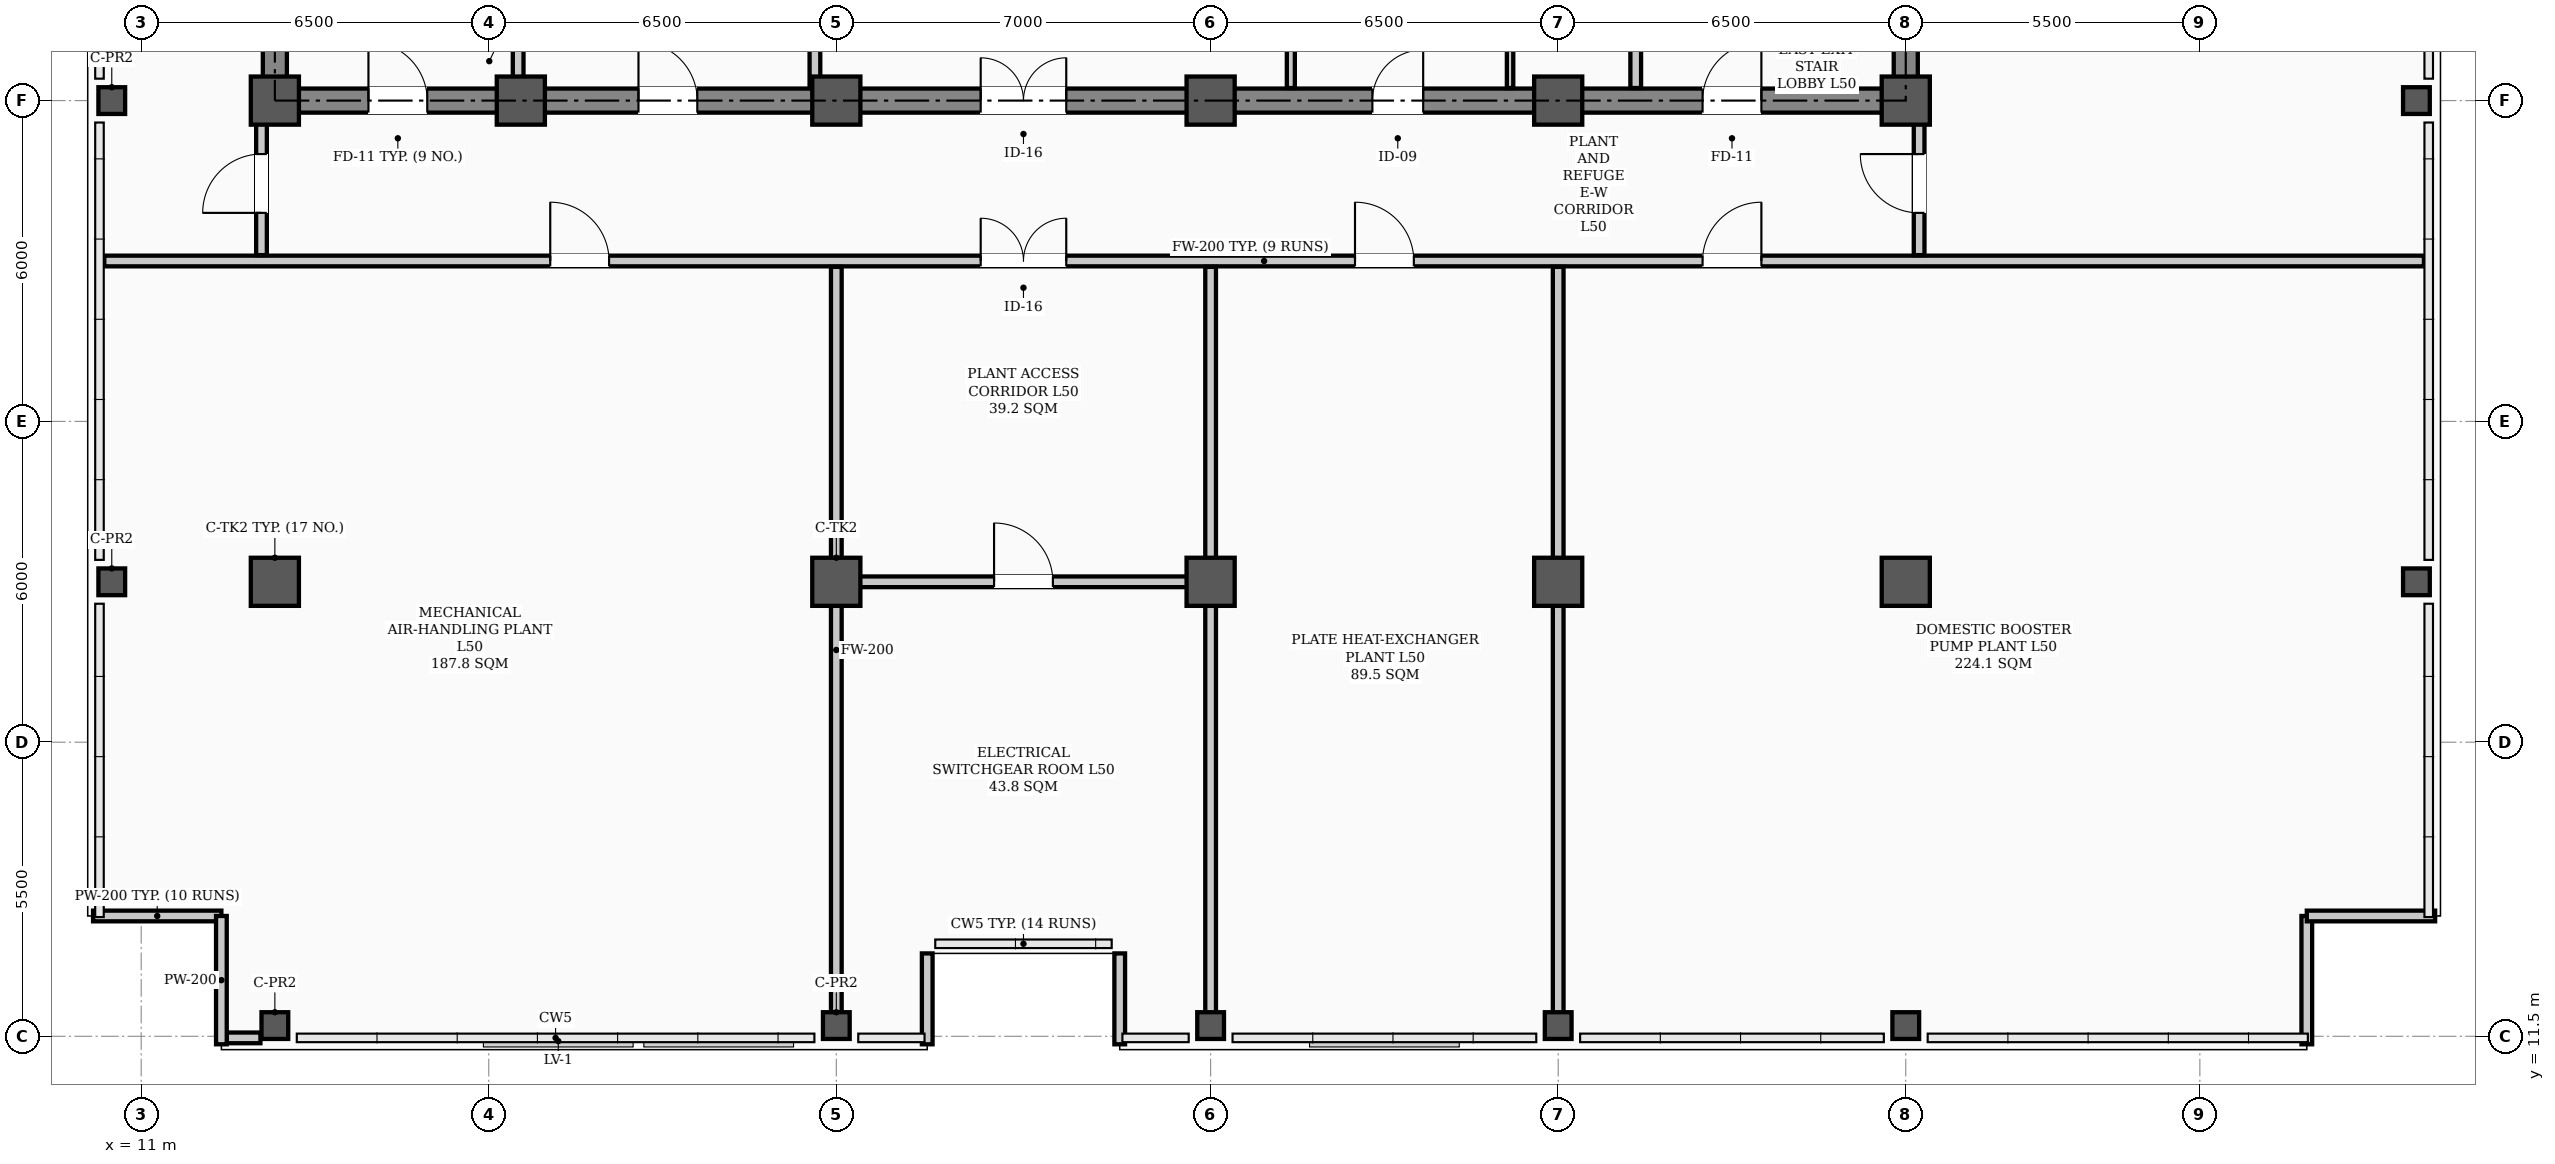
"""IFC4 building model, lengths in metres.
Left out: names, types, materials, properties, quantities, classifications, styles, units other than length and angle.
Written with IfcOpenShell. Run it as: python <this file> out.ifc"""

import sys

from ifc_helpers import new_model, si_unit, direction, frame, frame_2d, origin, origin_2d, place, context, subcontext, project, spatial, rectangle, hollow_rectangle, extrude, element, fill, save


model = new_model("IFC4")
c1 = context("Model", 3, precision=1e-05, world=origin(), true_north=direction((0.0, 1.0)))
c2 = subcontext(c1, "Body", "Model", "MODEL_VIEW")
j1 = project(units=[si_unit("LENGTHUNIT", "METRE"), si_unit("PLANEANGLEUNIT", "RADIAN")], contexts=[c1])
p1 = place(None, origin())
s1 = spatial("IfcSite", under=j1, at=p1, CompositionType="ELEMENT")
p2 = place(p1, origin())
s2 = spatial("IfcBuilding", under=s1, at=p2, CompositionType="ELEMENT")
p3 = place(p2, frame((0.0, 0.0, 200.7)))
s3 = spatial("IfcBuildingStorey", under=s2, at=p3, CompositionType="ELEMENT", Elevation=200.7)
for number, where, z_axis, x_axis in (
    (1, (13.5, 29.0, 0.0), (0.0, 0.0, 1.0), (1.0, 0.0, 0.0)),
    (2, (18.1, 29.0, 0.0), (0.0, 0.0, 1.0), (1.0, 0.0, 0.0)),
    (3, (24.0, 29.0, 0.0), (0.0, 0.0, 1.0), (1.0, 0.0, 0.0)),
    (4, (31.0, 29.0, 0.0), (0.0, 0.0, 1.0), (1.0, 0.0, 0.0)),
    (5, (37.5, 29.0, 0.0), (0.0, 0.0, 1.0), (1.0, 0.0, 0.0)),
    (6, (44.0, 29.0, 0.0), (0.0, 0.0, 1.0), (1.0, 0.0, 0.0)),
    (7, (13.5, 20.0, 0.0), (0.0, 0.0, 1.0), (1.0, 0.0, 0.0)),
    (8, (24.0, 20.0, 0.0), (0.0, 0.0, 1.0), (1.0, 0.0, 0.0)),
    (9, (31.0, 20.0, 0.0), (0.0, 0.0, 1.0), (1.0, 0.0, 0.0)),
    (10, (37.5, 20.0, 0.0), (0.0, 0.0, 1.0), (1.0, 0.0, 0.0)),
    (11, (44.0, 20.0, 0.0), (0.0, 0.0, 1.0), (1.0, 0.0, 0.0)),
):
    element("IfcColumn", number, at=place(p3, frame(where, z_axis=z_axis, x_axis=x_axis)), inside=s3, PredefinedType="COLUMN", context=c2, shape_type="SweptSolid", body=[
        extrude(hollow_rectangle(XDim=0.9, YDim=0.9, WallThickness=0.035, InnerFilletRadius=0.017, OuterFilletRadius=0.052, at=origin_2d()), origin(), (0.0, 0.0, 1.0), 5.4),
    ])
for number, where, z_axis, x_axis in (
    (12, (10.45, 20.0, 0.0), (0.0, 0.0, 1.0), (1.0, 0.0, 0.0)),
    (13, (10.45, 29.0, 0.0), (0.0, 0.0, 1.0), (1.0, 0.0, 0.0)),
    (14, (13.5, 11.7, 0.0), (0.0, 0.0, 1.0), (1.0, 0.0, 0.0)),
    (15, (24.0, 11.7, 0.0), (0.0, 0.0, 1.0), (1.0, 0.0, 0.0)),
    (16, (31.0, 11.7, 0.0), (0.0, 0.0, 1.0), (1.0, 0.0, 0.0)),
    (17, (37.5, 11.7, 0.0), (0.0, 0.0, 1.0), (1.0, 0.0, 0.0)),
    (18, (44.0, 11.7, 0.0), (0.0, 0.0, 1.0), (1.0, 0.0, 0.0)),
    (19, (53.55, 20.0, 0.0), (0.0, 0.0, 1.0), (1.0, 0.0, 0.0)),
    (20, (53.55, 29.0, 0.0), (0.0, 0.0, 1.0), (1.0, 0.0, 0.0)),
):
    element("IfcColumn", number, at=place(p3, frame(where, z_axis=z_axis, x_axis=x_axis)), inside=s3, PredefinedType="COLUMN", context=c2, shape_type="SweptSolid", body=[
        extrude(hollow_rectangle(XDim=0.5, YDim=0.5, WallThickness=0.024, InnerFilletRadius=0.012, OuterFilletRadius=0.036, at=origin_2d()), origin(), (0.0, 0.0, 1.0), 5.4),
    ])
p4 = place(p3, frame((12.6, 11.47, 0.0), z_axis=(0.0, 0.0, 1.0), x_axis=(1.0, 0.0, 0.0)))
e21 = element("IfcWall", 21, at=p4, inside=s3, PredefinedType="PARAPET", context=c2, shape_type="SweptSolid", body=[
    extrude(rectangle(XDim=0.63, YDim=0.2, at=frame_2d((0.315, 0.0))), origin(), (0.0, 0.0, 1.0), 1.2),
])
for number, where, z_axis, x_axis in (
    (22, (10.1, 13.75, 0.0), (0.0, 0.0, 1.0), (1.0, 0.0, 0.0)),
    (23, (12.5, 13.75, 0.0), (0.0, 0.0, 1.0), (0.0, -1.0, 0.0)),
    (24, (51.5, 11.35, 0.0), (0.0, 0.0, 1.0), (0.0, 1.0, 0.0)),
    (25, (51.5, 13.75, 0.0), (0.0, 0.0, 1.0), (1.0, 0.0, 0.0)),
):
    element("IfcWall", number, at=place(p3, frame(where, z_axis=z_axis, x_axis=x_axis)), inside=s3, PredefinedType="PARAPET", context=c2, shape_type="SweptSolid", body=[
        extrude(rectangle(XDim=2.4, YDim=0.2, at=frame_2d((1.2, 0.0))), origin(), (0.0, 0.0, 1.0), 1.2),
    ])
for number, where, z_axis, x_axis in (
    (26, (25.7, 11.35, 0.0), (0.0, 0.0, 1.0), (0.0, 1.0, 0.0)),
    (27, (29.3, 13.05, 0.0), (0.0, 0.0, 1.0), (0.0, -1.0, 0.0)),
):
    element("IfcWall", number, at=place(p3, frame(where, z_axis=z_axis, x_axis=x_axis)), inside=s3, PredefinedType="PARAPET", context=c2, shape_type="SweptSolid", body=[
        extrude(rectangle(XDim=1.7, YDim=0.2, at=frame_2d((0.85, 0.0))), origin(), (0.0, 0.0, 1.0), 1.2),
    ])
p5 = place(p3, frame((13.5, 29.0, 0.0), z_axis=(0.0, 0.0, 1.0), x_axis=(1.0, 0.0, 0.0)))
e28 = element("IfcWall", 28, at=p5, inside=s3, PredefinedType="SHEAR", context=c2, shape_type="SweptSolid", body=[
    extrude(rectangle(XDim=30.5, YDim=0.45, at=frame_2d((15.25, 0.0))), origin(), (0.0, 0.0, 1.0), 5.22),
])
p6 = place(p5, frame((1.75, 0.0, 0.0)))
e29 = element("IfcOpeningElement", 29, at=p6, cuts=e28, PredefinedType="OPENING", context=c2, shape_type="SweptSolid", body=[
    extrude(rectangle(XDim=1.1, YDim=2.08, at=frame_2d((0.55, 1.04))), frame((0.0, 0.235, 0.0), z_axis=(0.0, -1.0, 0.0), x_axis=(1.0, 0.0, 0.0)), (0.0, 0.0, 1.0), 0.47),
])
p7 = place(p5, frame((26.7, 0.0, 0.0)))
e30 = element("IfcOpeningElement", 30, at=p7, cuts=e28, PredefinedType="OPENING", context=c2, shape_type="SweptSolid", body=[
    extrude(rectangle(XDim=1.1, YDim=2.08, at=frame_2d((0.55, 1.04))), frame((0.0, 0.235, 0.0), z_axis=(0.0, -1.0, 0.0), x_axis=(1.0, 0.0, 0.0)), (0.0, 0.0, 1.0), 0.47),
])
p8 = place(p5, frame((6.8, 0.0, 0.0)))
e31 = element("IfcOpeningElement", 31, at=p8, cuts=e28, PredefinedType="OPENING", context=c2, shape_type="SweptSolid", body=[
    extrude(rectangle(XDim=1.1, YDim=2.08, at=frame_2d((0.55, 1.04))), frame((0.0, 0.235, 0.0), z_axis=(0.0, -1.0, 0.0), x_axis=(1.0, 0.0, 0.0)), (0.0, 0.0, 1.0), 0.47),
])
p9 = place(p5, frame((13.2, 0.0, 0.0)))
e32 = element("IfcOpeningElement", 32, at=p9, cuts=e28, PredefinedType="OPENING", context=c2, shape_type="SweptSolid", body=[
    extrude(rectangle(XDim=1.6, YDim=2.08, at=frame_2d((0.8, 1.04))), frame((0.0, 0.235, 0.0), z_axis=(0.0, -1.0, 0.0), x_axis=(1.0, 0.0, 0.0)), (0.0, 0.0, 1.0), 0.47),
])
p10 = place(p5, frame((20.525, 0.0, 0.0)))
e33 = element("IfcOpeningElement", 33, at=p10, cuts=e28, PredefinedType="OPENING", context=c2, shape_type="SweptSolid", body=[
    extrude(rectangle(XDim=0.95, YDim=2.08, at=frame_2d((0.475, 1.04))), frame((0.0, 0.235, 0.0), z_axis=(0.0, -1.0, 0.0), x_axis=(1.0, 0.0, 0.0)), (0.0, 0.0, 1.0), 0.47),
])
for number, where, z_axis, x_axis in (
    (34, (13.5, 29.35, 0.0), (0.0, 0.0, 1.0), (0.0, 1.0, 0.0)),
    (35, (44.0, 29.35, 0.0), (0.0, 0.0, 1.0), (0.0, 1.0, 0.0)),
):
    element("IfcWall", number, at=place(p3, frame(where, z_axis=z_axis, x_axis=x_axis)), inside=s3, PredefinedType="SHEAR", context=c2, shape_type="SweptSolid", body=[
        extrude(rectangle(XDim=8.6, YDim=0.45, at=frame_2d((4.3, 0.0))), origin(), (0.0, 0.0, 1.0), 5.22),
    ])
p11 = place(p3, frame((10.31, 26.0, 0.0), z_axis=(0.0, 0.0, 1.0), x_axis=(1.0, 0.0, 0.0)))
e36 = element("IfcWall", 36, at=p11, inside=s3, PredefinedType="STANDARD", context=c2, shape_type="SweptSolid", body=[
    extrude(rectangle(XDim=43.38, YDim=0.2, at=frame_2d((21.69, 0.0))), origin(), (0.0, 0.0, 1.0), 4.7),
])
p12 = place(p11, frame((8.34, 0.0, 0.0)))
e37 = element("IfcOpeningElement", 37, at=p12, cuts=e36, PredefinedType="OPENING", context=c2, shape_type="SweptSolid", body=[
    extrude(rectangle(XDim=1.1, YDim=2.08, at=frame_2d((0.55, 1.04))), frame((0.0, 0.11, 0.0), z_axis=(0.0, -1.0, 0.0), x_axis=(1.0, 0.0, 0.0)), (0.0, 0.0, 1.0), 0.22),
])
p13 = place(p11, frame((16.39, 0.0, 0.0)))
e38 = element("IfcOpeningElement", 38, at=p13, cuts=e36, PredefinedType="OPENING", context=c2, shape_type="SweptSolid", body=[
    extrude(rectangle(XDim=1.6, YDim=2.08, at=frame_2d((0.8, 1.04))), frame((0.0, 0.11, 0.0), z_axis=(0.0, -1.0, 0.0), x_axis=(1.0, 0.0, 0.0)), (0.0, 0.0, 1.0), 0.22),
])
p14 = place(p11, frame((23.39, 0.0, 0.0)))
e39 = element("IfcOpeningElement", 39, at=p14, cuts=e36, PredefinedType="OPENING", context=c2, shape_type="SweptSolid", body=[
    extrude(rectangle(XDim=1.1, YDim=2.08, at=frame_2d((0.55, 1.04))), frame((0.0, 0.11, 0.0), z_axis=(0.0, -1.0, 0.0), x_axis=(1.0, 0.0, 0.0)), (0.0, 0.0, 1.0), 0.22),
])
p15 = place(p11, frame((29.89, 0.0, 0.0)))
e40 = element("IfcOpeningElement", 40, at=p15, cuts=e36, PredefinedType="OPENING", context=c2, shape_type="SweptSolid", body=[
    extrude(rectangle(XDim=1.1, YDim=2.08, at=frame_2d((0.55, 1.04))), frame((0.0, 0.11, 0.0), z_axis=(0.0, -1.0, 0.0), x_axis=(1.0, 0.0, 0.0)), (0.0, 0.0, 1.0), 0.22),
])
p16 = place(p3, frame((24.0, 20.0, 0.0), z_axis=(0.0, 0.0, 1.0), x_axis=(1.0, 0.0, 0.0)))
e41 = element("IfcWall", 41, at=p16, inside=s3, PredefinedType="STANDARD", context=c2, shape_type="SweptSolid", body=[
    extrude(rectangle(XDim=7.0, YDim=0.2, at=frame_2d((3.5, 0.0))), origin(), (0.0, 0.0, 1.0), 4.6),
])
p17 = place(p16, frame((2.95, 0.0, 0.0)))
e42 = element("IfcOpeningElement", 42, at=p17, cuts=e41, PredefinedType="OPENING", context=c2, shape_type="SweptSolid", body=[
    extrude(rectangle(XDim=1.1, YDim=2.08, at=frame_2d((0.55, 1.04))), frame((0.0, 0.11, 0.0), z_axis=(0.0, -1.0, 0.0), x_axis=(1.0, 0.0, 0.0)), (0.0, 0.0, 1.0), 0.22),
])
for number, where, z_axis, x_axis in (
    (43, (18.05, 29.235, 0.0), (0.0, 0.0, 1.0), (0.0, 1.0, 0.0)),
    (44, (38.95, 29.235, 0.0), (0.0, 0.0, 1.0), (0.0, 1.0, 0.0)),
):
    element("IfcWall", number, at=place(p3, frame(where, z_axis=z_axis, x_axis=x_axis)), inside=s3, PredefinedType="STANDARD", context=c2, shape_type="SweptSolid", body=[
        extrude(rectangle(XDim=1.065, YDim=0.2, at=frame_2d((0.532, 0.0))), origin(), (0.0, 0.0, 1.0), 4.85),
    ])
p18 = place(p3, frame((23.6, 29.235, 0.0), z_axis=(0.0, 0.0, 1.0), x_axis=(0.0, 1.0, 0.0)))
e45 = element("IfcWall", 45, at=p18, inside=s3, PredefinedType="STANDARD", context=c2, shape_type="SweptSolid", body=[
    extrude(rectangle(XDim=5.465, YDim=0.2, at=frame_2d((2.732, 0.0))), origin(), (0.0, 0.0, 1.0), 4.7),
])
p19 = place(p3, frame((32.5, 29.235, 0.0), z_axis=(0.0, 0.0, 1.0), x_axis=(0.0, 1.0, 0.0)))
e46 = element("IfcWall", 46, at=p19, inside=s3, PredefinedType="PARTITIONING", context=c2, shape_type="SweptSolid", body=[
    extrude(rectangle(XDim=2.53, YDim=0.15, at=frame_2d((1.265, 0.0))), origin(), (0.0, 0.0, 1.0), 4.85),
])
p20 = place(p3, frame((36.6, 29.235, 0.0), z_axis=(0.0, 0.0, 1.0), x_axis=(0.0, 1.0, 0.0)))
e47 = element("IfcWall", 47, at=p20, inside=s3, PredefinedType="PARTITIONING", context=c2, shape_type="SweptSolid", body=[
    extrude(rectangle(XDim=2.53, YDim=0.12, at=frame_2d((1.265, 0.0))), origin(), (0.0, 0.0, 1.0), 4.85),
])
p21 = place(p3, frame((13.25, 26.11, 0.0), z_axis=(0.0, 0.0, 1.0), x_axis=(0.0, 1.0, 0.0)))
e48 = element("IfcWall", 48, at=p21, inside=s3, PredefinedType="STANDARD", context=c2, shape_type="SweptSolid", body=[
    extrude(rectangle(XDim=3.24, YDim=0.2, at=frame_2d((1.62, 0.0))), origin(), (0.0, 0.0, 1.0), 4.6),
])
p22 = place(p21, frame((0.79, 0.0, 0.0)))
e49 = element("IfcOpeningElement", 49, at=p22, cuts=e48, PredefinedType="OPENING", context=c2, shape_type="SweptSolid", body=[
    extrude(rectangle(XDim=1.1, YDim=2.08, at=frame_2d((0.55, 1.04))), frame((0.0, 0.11, 0.0), z_axis=(0.0, -1.0, 0.0), x_axis=(1.0, 0.0, 0.0)), (0.0, 0.0, 1.0), 0.22),
])
p23 = place(p3, frame((44.25, 26.11, 0.0), z_axis=(0.0, 0.0, 1.0), x_axis=(0.0, 1.0, 0.0)))
e50 = element("IfcWall", 50, at=p23, inside=s3, PredefinedType="STANDARD", context=c2, shape_type="SweptSolid", body=[
    extrude(rectangle(XDim=3.24, YDim=0.2, at=frame_2d((1.62, 0.0))), origin(), (0.0, 0.0, 1.0), 4.6),
])
p24 = place(p23, frame((0.79, 0.0, 0.0)))
e51 = element("IfcOpeningElement", 51, at=p24, cuts=e50, PredefinedType="OPENING", context=c2, shape_type="SweptSolid", body=[
    extrude(rectangle(XDim=1.1, YDim=2.08, at=frame_2d((0.55, 1.04))), frame((0.0, 0.11, 0.0), z_axis=(0.0, -1.0, 0.0), x_axis=(1.0, 0.0, 0.0)), (0.0, 0.0, 1.0), 0.22),
])
for number, where, z_axis, x_axis in (
    (52, (24.0, 11.56, 0.0), (0.0, 0.0, 1.0), (0.0, 1.0, 0.0)),
    (53, (31.0, 11.56, 0.0), (0.0, 0.0, 1.0), (0.0, 1.0, 0.0)),
    (54, (37.5, 11.56, 0.0), (0.0, 0.0, 1.0), (0.0, 1.0, 0.0)),
):
    element("IfcWall", number, at=place(p3, frame(where, z_axis=z_axis, x_axis=x_axis)), inside=s3, PredefinedType="STANDARD", context=c2, shape_type="SweptSolid", body=[
        extrude(rectangle(XDim=14.33, YDim=0.2, at=frame_2d((7.165, 0.0))), origin(), (0.0, 0.0, 1.0), 4.6),
    ])
p25 = place(p6, origin())
e55 = element("IfcDoor", 55, at=p25, inside=s3, OperationType="SINGLE_SWING_LEFT", PredefinedType="DOOR", context=c2, shape_type="SweptSolid", body=[
    extrude(rectangle(XDim=1.1, YDim=2.08, at=frame_2d((0.55, 1.04))), frame((0.0, 0.025, 0.0), z_axis=(0.0, -1.0, 0.0), x_axis=(1.0, 0.0, 0.0)), (0.0, 0.0, 1.0), 0.05),
])
fill(e29, e55)
p26 = place(p7, origin())
e56 = element("IfcDoor", 56, at=p26, inside=s3, OperationType="SINGLE_SWING_RIGHT", PredefinedType="DOOR", context=c2, shape_type="SweptSolid", body=[
    extrude(rectangle(XDim=1.1, YDim=2.08, at=frame_2d((0.55, 1.04))), frame((0.0, 0.025, 0.0), z_axis=(0.0, -1.0, 0.0), x_axis=(1.0, 0.0, 0.0)), (0.0, 0.0, 1.0), 0.05),
])
fill(e30, e56)
p27 = place(p8, origin())
e57 = element("IfcDoor", 57, at=p27, inside=s3, OperationType="SINGLE_SWING_LEFT", PredefinedType="DOOR", context=c2, shape_type="SweptSolid", body=[
    extrude(rectangle(XDim=1.1, YDim=2.08, at=frame_2d((0.55, 1.04))), frame((0.0, 0.025, 0.0), z_axis=(0.0, -1.0, 0.0), x_axis=(1.0, 0.0, 0.0)), (0.0, 0.0, 1.0), 0.05),
])
fill(e31, e57)
p28 = place(p9, origin())
e58 = element("IfcDoor", 58, at=p28, inside=s3, OperationType="DOUBLE_DOOR_SINGLE_SWING", PredefinedType="DOOR", context=c2, shape_type="SweptSolid", body=[
    extrude(rectangle(XDim=1.6, YDim=2.08, at=frame_2d((0.8, 1.04))), frame((0.0, 0.025, 0.0), z_axis=(0.0, -1.0, 0.0), x_axis=(1.0, 0.0, 0.0)), (0.0, 0.0, 1.0), 0.05),
])
fill(e32, e58)
p29 = place(p10, origin())
e59 = element("IfcDoor", 59, at=p29, inside=s3, OperationType="SINGLE_SWING_RIGHT", PredefinedType="DOOR", context=c2, shape_type="SweptSolid", body=[
    extrude(rectangle(XDim=0.95, YDim=2.08, at=frame_2d((0.475, 1.04))), frame((0.0, 0.025, 0.0), z_axis=(0.0, -1.0, 0.0), x_axis=(1.0, 0.0, 0.0)), (0.0, 0.0, 1.0), 0.05),
])
fill(e33, e59)
p30 = place(p22, origin())
e60 = element("IfcDoor", 60, at=p30, inside=s3, OperationType="SINGLE_SWING_LEFT", PredefinedType="DOOR", context=c2, shape_type="SweptSolid", body=[
    extrude(rectangle(XDim=1.1, YDim=2.08, at=frame_2d((0.55, 1.04))), frame((0.0, 0.025, 0.0), z_axis=(0.0, -1.0, 0.0), x_axis=(1.0, 0.0, 0.0)), (0.0, 0.0, 1.0), 0.05),
])
fill(e49, e60)
p31 = place(p24, origin())
e61 = element("IfcDoor", 61, at=p31, inside=s3, OperationType="SINGLE_SWING_RIGHT", PredefinedType="DOOR", context=c2, shape_type="SweptSolid", body=[
    extrude(rectangle(XDim=1.1, YDim=2.08, at=frame_2d((0.55, 1.04))), frame((0.0, 0.025, 0.0), z_axis=(0.0, -1.0, 0.0), x_axis=(1.0, 0.0, 0.0)), (0.0, 0.0, 1.0), 0.05),
])
fill(e51, e61)
p32 = place(p12, origin())
e62 = element("IfcDoor", 62, at=p32, inside=s3, OperationType="SINGLE_SWING_LEFT", PredefinedType="DOOR", context=c2, shape_type="SweptSolid", body=[
    extrude(rectangle(XDim=1.1, YDim=2.08, at=frame_2d((0.55, 1.04))), frame((0.0, 0.025, 0.0), z_axis=(0.0, -1.0, 0.0), x_axis=(1.0, 0.0, 0.0)), (0.0, 0.0, 1.0), 0.05),
])
fill(e37, e62)
p33 = place(p13, origin())
e63 = element("IfcDoor", 63, at=p33, inside=s3, OperationType="DOUBLE_DOOR_SINGLE_SWING", PredefinedType="DOOR", context=c2, shape_type="SweptSolid", body=[
    extrude(rectangle(XDim=1.6, YDim=2.08, at=frame_2d((0.8, 1.04))), frame((0.0, 0.025, 0.0), z_axis=(0.0, -1.0, 0.0), x_axis=(1.0, 0.0, 0.0)), (0.0, 0.0, 1.0), 0.05),
])
fill(e38, e63)
p34 = place(p14, origin())
e64 = element("IfcDoor", 64, at=p34, inside=s3, OperationType="SINGLE_SWING_LEFT", PredefinedType="DOOR", context=c2, shape_type="SweptSolid", body=[
    extrude(rectangle(XDim=1.1, YDim=2.08, at=frame_2d((0.55, 1.04))), frame((0.0, 0.025, 0.0), z_axis=(0.0, -1.0, 0.0), x_axis=(1.0, 0.0, 0.0)), (0.0, 0.0, 1.0), 0.05),
])
fill(e39, e64)
p35 = place(p15, origin())
e65 = element("IfcDoor", 65, at=p35, inside=s3, OperationType="SINGLE_SWING_RIGHT", PredefinedType="DOOR", context=c2, shape_type="SweptSolid", body=[
    extrude(rectangle(XDim=1.1, YDim=2.08, at=frame_2d((0.55, 1.04))), frame((0.0, 0.025, 0.0), z_axis=(0.0, -1.0, 0.0), x_axis=(1.0, 0.0, 0.0)), (0.0, 0.0, 1.0), 0.05),
])
fill(e40, e65)
p36 = place(p17, origin())
e66 = element("IfcDoor", 66, at=p36, inside=s3, OperationType="SINGLE_SWING_LEFT", PredefinedType="DOOR", context=c2, shape_type="SweptSolid", body=[
    extrude(rectangle(XDim=1.1, YDim=2.08, at=frame_2d((0.55, 1.04))), frame((0.0, 0.025, 0.0), z_axis=(0.0, -1.0, 0.0), x_axis=(1.0, 0.0, 0.0)), (0.0, 0.0, 1.0), 0.05),
])
fill(e42, e66)
save(model, sys.argv[1])
